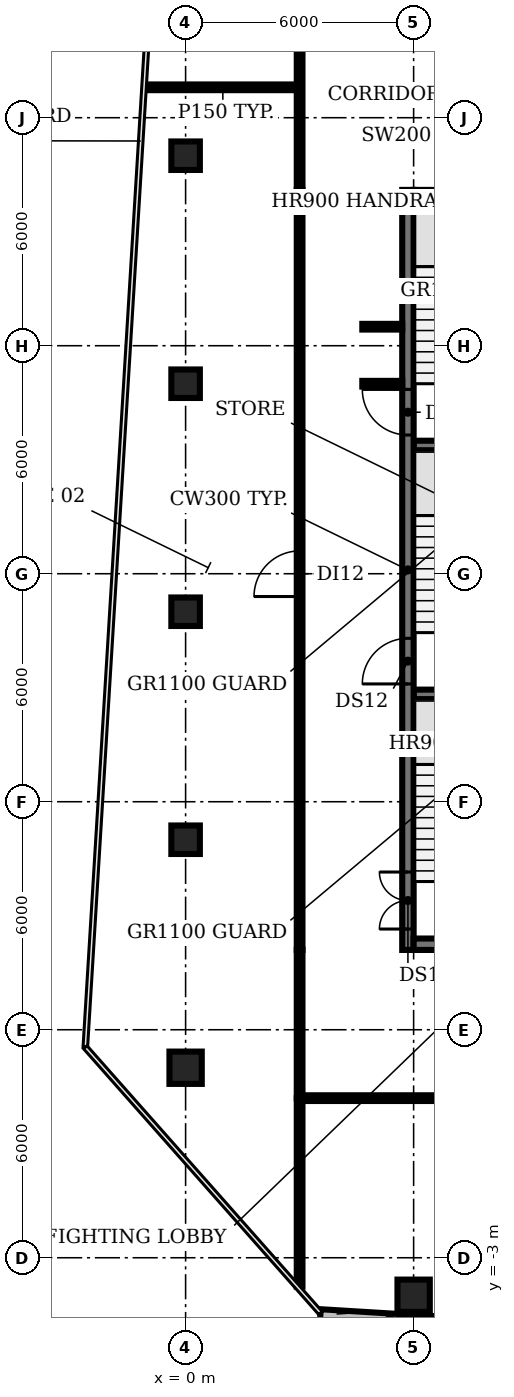
"""IFC4 building model, lengths in metres.
Left out: names, types, materials, properties, quantities, classifications, styles, units other than length and angle.
Written with IfcOpenShell. Run it as: python <this file> out.ifc"""

import sys

from ifc_helpers import new_model, si_unit, direction, frame, frame_2d, origin, origin_2d, place, context, subcontext, project, spatial, rectangle, circle, extrude, element, fill, save


model = new_model("IFC4")
c1 = context("Model", 3, precision=1e-05, world=origin(), true_north=direction((0.0, 1.0)))
c2 = subcontext(c1, "Body", "Model", "MODEL_VIEW")
j1 = project(units=[si_unit("LENGTHUNIT", "METRE"), si_unit("PLANEANGLEUNIT", "RADIAN")], contexts=[c1])
p1 = place(None, origin())
s1 = spatial("IfcSite", under=j1, at=p1, CompositionType="ELEMENT")
p2 = place(p1, origin())
s2 = spatial("IfcBuilding", under=s1, at=p2, CompositionType="ELEMENT")
p3 = place(p2, frame((0.0, 0.0, 272.6)))
s3 = spatial("IfcBuildingStorey", under=s2, at=p3, CompositionType="ELEMENT", Elevation=272.6)
p4 = place(p3, frame((0.0, 2.0, 0.0), z_axis=(0.0, 0.0, 1.0), x_axis=(1.0, 0.0, 0.0)))
e1 = element("IfcColumn", 1, at=p4, inside=s3, PredefinedType="COLUMN", context=c2, shape_type="SweptSolid", body=[
    extrude(circle(Radius=0.425, at=origin_2d()), origin(), (0.0, 0.0, 1.0), 3.85),
])
for number, where, z_axis, x_axis in (
    (2, (0.0, 8.0, 0.0), (0.0, 0.0, 1.0), (1.0, 0.0, 0.0)),
    (3, (0.0, 14.0, 0.0), (0.0, 0.0, 1.0), (1.0, 0.0, 0.0)),
    (4, (0.0, 20.0, 0.0), (0.0, 0.0, 1.0), (1.0, 0.0, 0.0)),
    (5, (0.0, 26.0, 0.0), (0.0, 0.0, 1.0), (1.0, 0.0, 0.0)),
):
    element("IfcColumn", number, at=place(p3, frame(where, z_axis=z_axis, x_axis=x_axis)), inside=s3, PredefinedType="COLUMN", context=c2, shape_type="SweptSolid", body=[
        extrude(rectangle(XDim=0.75, YDim=0.75, at=origin_2d()), origin(), (0.0, 0.0, 1.0), 3.85),
    ])
p5 = place(p3, frame((6.0, -4.0, 0.0), z_axis=(0.0, 0.0, 1.0), x_axis=(1.0, 0.0, 0.0)))
e6 = element("IfcColumn", 6, at=p5, inside=s3, PredefinedType="COLUMN", context=c2, shape_type="SweptSolid", body=[
    extrude(circle(Radius=0.425, at=origin_2d()), origin(), (0.0, 0.0, 1.0), 3.85),
])
p6 = place(p3, frame((3.546, -4.504, 0.0), z_axis=(0.0, 0.0, 1.0), x_axis=(0.99813413764, -0.061059342256, 0.0)))
e7 = element("IfcWall", 7, at=p6, inside=s3, PredefinedType="SOLIDWALL", context=c2, shape_type="SweptSolid", body=[
    extrude(rectangle(XDim=6.166, YDim=0.3, at=frame_2d((3.083, 0.0))), origin(), (0.0, 0.0, 1.0), 3.85),
])
for number, where, z_axis, x_axis in (
    (8, (6.0, 11.825, 0.0), (0.0, 0.0, 1.0), (1.0, 0.0, 0.0)),
    (9, (6.0, 18.375, 0.0), (0.0, 0.0, 1.0), (1.0, 0.0, 0.0)),
):
    element("IfcWall", number, at=place(p3, frame(where, z_axis=z_axis, x_axis=x_axis)), inside=s3, PredefinedType="SHEAR", context=c2, shape_type="SweptSolid", body=[
        extrude(rectangle(XDim=3.15, YDim=0.25, at=frame_2d((1.575, 0.0))), origin(), (0.0, 0.0, 1.0), 3.85),
    ])
p7 = place(p3, frame((5.85, 5.1, 0.0), z_axis=(0.0, 0.0, 1.0), x_axis=(0.0, 1.0, 0.0)))
e10 = element("IfcWall", 10, at=p7, inside=s3, PredefinedType="SHEAR", context=c2, shape_type="SweptSolid", body=[
    extrude(rectangle(XDim=20.0, YDim=0.3, at=frame_2d((10.0, 0.0))), origin(), (0.0, 0.0, 1.0), 3.85),
])
p8 = place(p7, frame((0.55, 0.0, 0.0)))
e11 = element("IfcOpeningElement", 11, at=p8, cuts=e10, PredefinedType="OPENING", context=c2, shape_type="SweptSolid", body=[
    extrude(rectangle(XDim=1.5, YDim=2.1, at=frame_2d((0.75, 1.05))), frame((0.0, 0.16, 0.0), z_axis=(0.0, -1.0, 0.0), x_axis=(1.0, 0.0, 0.0)), (0.0, 0.0, 1.0), 0.32),
])
p9 = place(p7, frame((7.0, 0.0, 0.0)))
e12 = element("IfcOpeningElement", 12, at=p9, cuts=e10, PredefinedType="OPENING", context=c2, shape_type="SweptSolid", body=[
    extrude(rectangle(XDim=1.2, YDim=2.1, at=frame_2d((0.6, 1.05))), frame((0.0, 0.16, 0.0), z_axis=(0.0, -1.0, 0.0), x_axis=(1.0, 0.0, 0.0)), (0.0, 0.0, 1.0), 0.32),
])
p10 = place(p7, frame((13.55, 0.0, 0.0)))
e13 = element("IfcOpeningElement", 13, at=p10, cuts=e10, PredefinedType="OPENING", context=c2, shape_type="SweptSolid", body=[
    extrude(rectangle(XDim=1.2, YDim=2.1, at=frame_2d((0.6, 1.05))), frame((0.0, 0.16, 0.0), z_axis=(0.0, -1.0, 0.0), x_axis=(1.0, 0.0, 0.0)), (0.0, 0.0, 1.0), 0.32),
])
p11 = place(p3, frame((24.0, 5.25, 0.0), z_axis=(0.0, 0.0, 1.0), x_axis=(-1.0, 0.0, 0.0)))
e14 = element("IfcWall", 14, at=p11, inside=s3, PredefinedType="SHEAR", context=c2, shape_type="SweptSolid", body=[
    extrude(rectangle(XDim=18.0, YDim=0.3, at=frame_2d((9.0, 0.0))), origin(), (0.0, 0.0, 1.0), 3.85),
])
p12 = place(p11, frame((13.0, 0.0, 0.0)))
e15 = element("IfcOpeningElement", 15, at=p12, cuts=e14, PredefinedType="OPENING", context=c2, shape_type="SweptSolid", body=[
    extrude(rectangle(XDim=1.2, YDim=2.1, at=frame_2d((0.6, 1.05))), frame((0.0, 0.16, 0.0), z_axis=(0.0, -1.0, 0.0), x_axis=(1.0, 0.0, 0.0)), (0.0, 0.0, 1.0), 0.32),
])
p13 = place(p11, frame((4.9, 0.0, 0.0)))
e16 = element("IfcOpeningElement", 16, at=p13, cuts=e14, PredefinedType="OPENING", context=c2, shape_type="SweptSolid", body=[
    extrude(rectangle(XDim=1.0, YDim=2.1, at=frame_2d((0.5, 1.05))), frame((0.0, 0.16, 0.0), z_axis=(0.0, -1.0, 0.0), x_axis=(1.0, 0.0, 0.0)), (0.0, 0.0, 1.0), 0.32),
])
p14 = place(p3, frame((6.0, 24.95, 0.0), z_axis=(0.0, 0.0, 1.0), x_axis=(1.0, 0.0, 0.0)))
e17 = element("IfcWall", 17, at=p14, inside=s3, PredefinedType="SHEAR", context=c2, shape_type="SweptSolid", body=[
    extrude(rectangle(XDim=18.0, YDim=0.3, at=frame_2d((9.0, 0.0))), origin(), (0.0, 0.0, 1.0), 3.85),
])
p15 = place(p3, frame((-1.04, 27.8, 0.0), z_axis=(0.0, 0.0, 1.0), x_axis=(1.0, 0.0, 0.0)))
e18 = element("IfcWall", 18, at=p15, inside=s3, PredefinedType="PARTITIONING", context=c2, shape_type="SweptSolid", body=[
    extrude(rectangle(XDim=4.04, YDim=0.15, at=frame_2d((2.02, 0.0))), origin(), (0.0, 0.0, 1.0), 2.9),
])
p16 = place(p3, frame((3.0, -3.76, 0.0), z_axis=(0.0, 0.0, 1.0), x_axis=(0.0, 1.0, 0.0)))
e19 = element("IfcWall", 19, at=p16, inside=s3, PredefinedType="PARTITIONING", context=c2, shape_type="SweptSolid", body=[
    extrude(rectangle(XDim=4.96, YDim=0.15, at=frame_2d((2.48, 0.0))), origin(), (0.0, 0.0, 1.0), 2.9),
])
p17 = place(p3, frame((3.0, 1.2, 0.0), z_axis=(0.0, 0.0, 1.0), x_axis=(0.0, 1.0, 0.0)))
e20 = element("IfcWall", 20, at=p17, inside=s3, PredefinedType="PARTITIONING", context=c2, shape_type="SweptSolid", body=[
    extrude(rectangle(XDim=3.9, YDim=0.15, at=frame_2d((1.95, 0.0))), origin(), (0.0, 0.0, 1.0), 2.9),
])
p18 = place(p3, frame((3.0, 5.1, 0.0), z_axis=(0.0, 0.0, 1.0), x_axis=(0.0, 1.0, 0.0)))
e21 = element("IfcWall", 21, at=p18, inside=s3, PredefinedType="PARTITIONING", context=c2, shape_type="SweptSolid", body=[
    extrude(rectangle(XDim=20.0, YDim=0.15, at=frame_2d((10.0, 0.0))), origin(), (0.0, 0.0, 1.0), 2.9),
])
p19 = place(p18, frame((9.3, 0.0, 0.0)))
e22 = element("IfcOpeningElement", 22, at=p19, cuts=e21, PredefinedType="OPENING", context=c2, shape_type="SweptSolid", body=[
    extrude(rectangle(XDim=1.2, YDim=2.1, at=frame_2d((0.6, 1.05))), frame((0.0, 0.085, 0.0), z_axis=(0.0, -1.0, 0.0), x_axis=(1.0, 0.0, 0.0)), (0.0, 0.0, 1.0), 0.17),
])
p20 = place(p3, frame((3.0, 25.1, 0.0), z_axis=(0.0, 0.0, 1.0), x_axis=(0.0, 1.0, 0.0)))
e23 = element("IfcWall", 23, at=p20, inside=s3, PredefinedType="PARTITIONING", context=c2, shape_type="SweptSolid", body=[
    extrude(rectangle(XDim=3.9, YDim=0.15, at=frame_2d((1.95, 0.0))), origin(), (0.0, 0.0, 1.0), 2.9),
])
for number, where, z_axis, x_axis in (
    (24, (4.65, 20.0, 0.0), (0.0, 0.0, 1.0), (1.0, 0.0, 0.0)),
    (25, (4.65, 21.5, 0.0), (0.0, 0.0, 1.0), (1.0, 0.0, 0.0)),
):
    element("IfcWall", number, at=place(p3, frame(where, z_axis=z_axis, x_axis=x_axis)), inside=s3, PredefinedType="PARTITIONING", context=c2, shape_type="SweptSolid", body=[
        extrude(rectangle(XDim=1.05, YDim=0.15, at=frame_2d((0.525, 0.0))), origin(), (0.0, 0.0, 1.0), 2.9),
    ])
p21 = place(p3, frame((27.0, 1.2, 0.0), z_axis=(0.0, 0.0, 1.0), x_axis=(-1.0, 0.0, 0.0)))
e26 = element("IfcWall", 26, at=p21, inside=s3, PredefinedType="PARTITIONING", context=c2, shape_type="SweptSolid", body=[
    extrude(rectangle(XDim=24.0, YDim=0.15, at=frame_2d((12.0, 0.0))), origin(), (0.0, 0.0, 1.0), 2.9),
])
p22 = place(p21, frame((11.5, 0.0, 0.0)))
e27 = element("IfcOpeningElement", 27, at=p22, cuts=e26, PredefinedType="OPENING", context=c2, shape_type="SweptSolid", body=[
    extrude(rectangle(XDim=1.2, YDim=2.1, at=frame_2d((0.6, 1.05))), frame((0.0, 0.085, 0.0), z_axis=(0.0, -1.0, 0.0), x_axis=(1.0, 0.0, 0.0)), (0.0, 0.0, 1.0), 0.17),
])
p23 = place(p8, origin())
e28 = element("IfcDoor", 28, at=p23, inside=s3, OperationType="DOUBLE_DOOR_SINGLE_SWING", PredefinedType="DOOR", context=c2, shape_type="SweptSolid", body=[
    extrude(rectangle(XDim=1.5, YDim=2.1, at=frame_2d((0.75, 1.05))), frame((0.0, 0.025, 0.0), z_axis=(0.0, -1.0, 0.0), x_axis=(1.0, 0.0, 0.0)), (0.0, 0.0, 1.0), 0.05),
])
fill(e11, e28)
p24 = place(p9, origin())
e29 = element("IfcDoor", 29, at=p24, inside=s3, OperationType="SINGLE_SWING_LEFT", PredefinedType="DOOR", context=c2, shape_type="SweptSolid", body=[
    extrude(rectangle(XDim=1.2, YDim=2.1, at=frame_2d((0.6, 1.05))), frame((0.0, 0.025, 0.0), z_axis=(0.0, -1.0, 0.0), x_axis=(1.0, 0.0, 0.0)), (0.0, 0.0, 1.0), 0.05),
])
fill(e12, e29)
p25 = place(p10, origin())
e30 = element("IfcDoor", 30, at=p25, inside=s3, OperationType="SINGLE_SWING_RIGHT", PredefinedType="DOOR", context=c2, shape_type="SweptSolid", body=[
    extrude(rectangle(XDim=1.2, YDim=2.1, at=frame_2d((0.6, 1.05))), frame((0.0, 0.025, 0.0), z_axis=(0.0, -1.0, 0.0), x_axis=(1.0, 0.0, 0.0)), (0.0, 0.0, 1.0), 0.05),
])
fill(e13, e30)
p26 = place(p19, origin())
e31 = element("IfcDoor", 31, at=p26, inside=s3, OperationType="SINGLE_SWING_LEFT", PredefinedType="DOOR", context=c2, shape_type="SweptSolid", body=[
    extrude(rectangle(XDim=1.2, YDim=2.1, at=frame_2d((0.6, 1.05))), frame((0.0, 0.025, 0.0), z_axis=(0.0, -1.0, 0.0), x_axis=(1.0, 0.0, 0.0)), (0.0, 0.0, 1.0), 0.05),
])
fill(e22, e31)
save(model, sys.argv[1])
